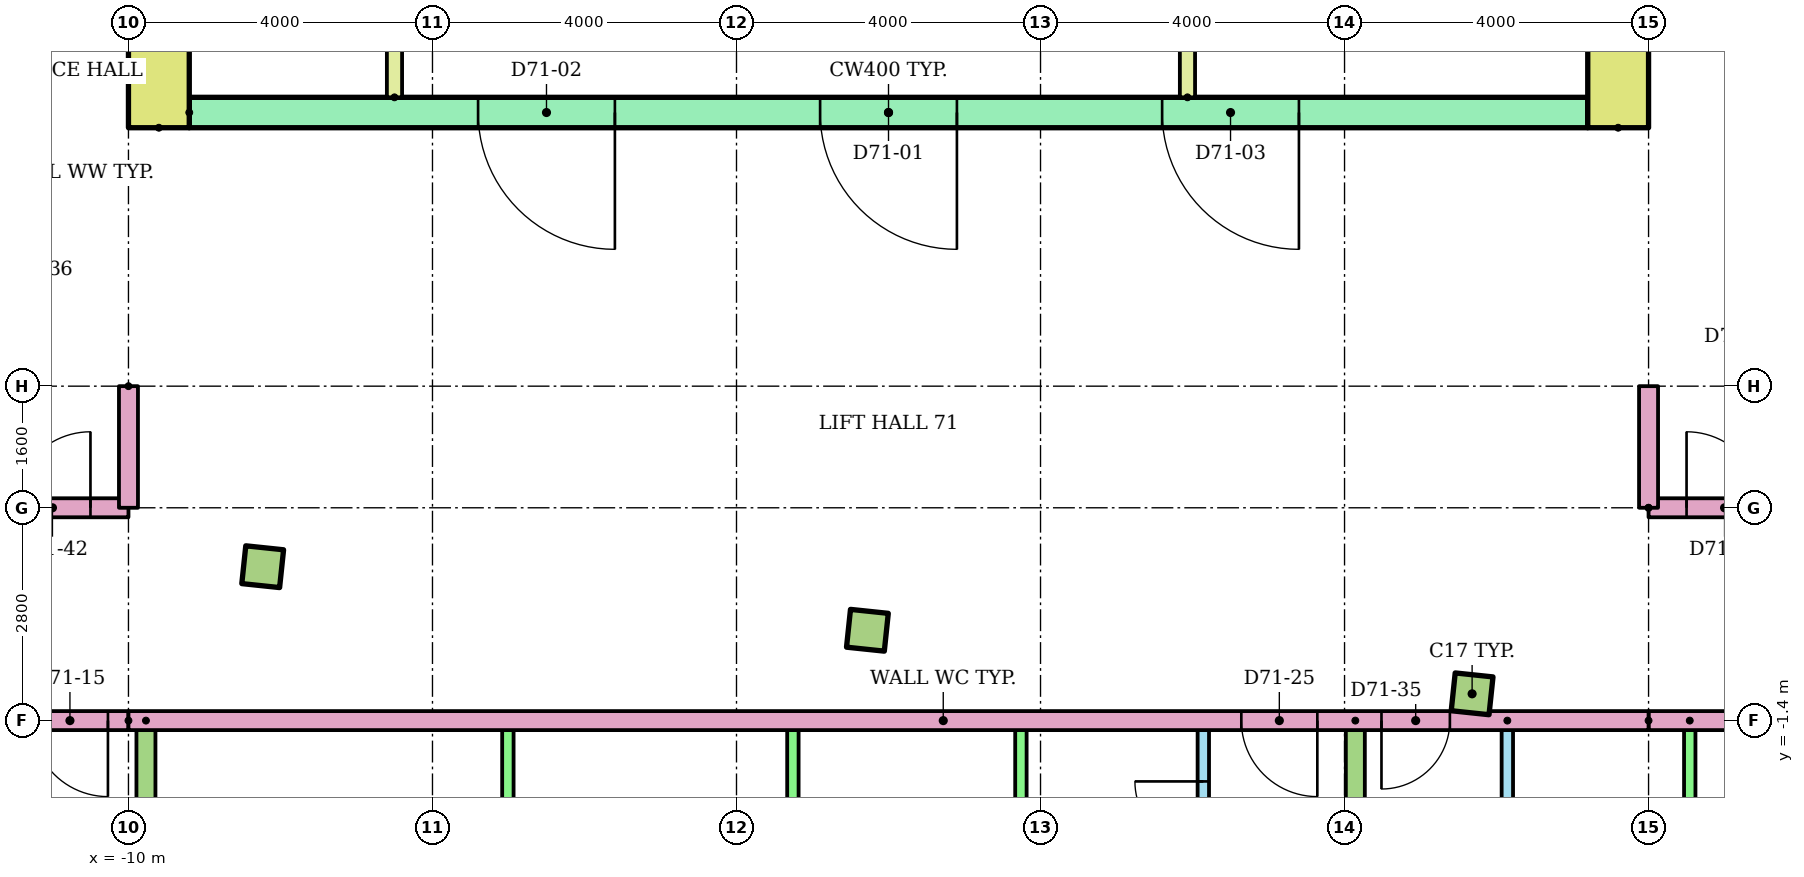
"""IFC4 building model, lengths in metres.
Left out: names, types, materials, properties, quantities, classifications, styles, units other than length and angle.
Written with IfcOpenShell. Run it as: python <this file> out.ifc"""

import sys

from ifc_helpers import new_model, si_unit, direction, frame, frame_2d, origin, origin_2d, place, context, subcontext, project, spatial, rectangle, extrude, element, fill, save


model = new_model("IFC4")
c1 = context("Model", 3, precision=1e-05, world=origin(), true_north=direction((0.0, 1.0)))
c2 = subcontext(c1, "Body", "Model", "MODEL_VIEW")
j1 = project(units=[si_unit("LENGTHUNIT", "METRE"), si_unit("PLANEANGLEUNIT", "RADIAN")], contexts=[c1])
p1 = place(None, origin())
s1 = spatial("IfcSite", under=j1, at=p1, CompositionType="ELEMENT")
p2 = place(p1, origin())
s2 = spatial("IfcBuilding", under=s1, at=p2, CompositionType="ELEMENT")
p3 = place(p2, frame((0.0, 0.0, 272.3)))
s3 = spatial("IfcBuildingStorey", under=s2, at=p3, CompositionType="ELEMENT", Elevation=272.3)
for number, where, z_axis, x_axis in (
    (1, (-8.234, 0.625, 0.0), (0.0, 0.0, 1.0), (0.995, -0.105, 0.0)),
    (2, (-0.278, -0.211, 0.0), (0.0, 0.0, 1.0), (0.995, -0.105, 0.0)),
    (3, (7.678, -1.048, 0.0), (0.0, 0.0, 1.0), (0.995, -0.105, 0.0)),
):
    element("IfcColumn", number, at=place(p3, frame(where, z_axis=z_axis, x_axis=x_axis)), inside=s3, PredefinedType="COLUMN", context=c2, shape_type="SweptSolid", body=[
        extrude(rectangle(XDim=0.5, YDim=0.5, at=origin_2d()), origin(), (0.0, 0.0, 1.0), 3.2),
    ])
for number, where, z_axis, x_axis in (
    (4, (-9.6, 6.4, 0.0), (0.0, 0.0, 1.0), (0.0, 1.0, 0.0)),
    (5, (9.6, 6.4, 0.0), (0.0, 0.0, 1.0), (0.0, 1.0, 0.0)),
):
    element("IfcWall", number, at=place(p3, frame(where, z_axis=z_axis, x_axis=x_axis)), inside=s3, PredefinedType="SHEAR", context=c2, shape_type="SweptSolid", body=[
        extrude(rectangle(XDim=13.6, YDim=0.8, at=frame_2d((6.8, 0.0))), origin(), (0.0, 0.0, 1.0), 2.92),
    ])
p4 = place(p3, frame((-9.2, 6.6, 0.0)))
e6 = element("IfcWall", 6, at=p4, inside=s3, PredefinedType="SHEAR", context=c2, shape_type="SweptSolid", body=[
    extrude(rectangle(XDim=18.4, YDim=0.4, at=frame_2d((9.2, 0.0))), origin(), (0.0, 0.0, 1.0), 2.92),
])
p5 = place(p4, frame((8.3, 0.0, 0.0)))
e7 = element("IfcOpeningElement", 7, at=p5, cuts=e6, PredefinedType="OPENING", context=c2, shape_type="SweptSolid", body=[
    extrude(rectangle(XDim=1.8, YDim=2.1, at=frame_2d((0.9, 1.05))), frame((0.0, 0.21, 0.0), z_axis=(0.0, -1.0, 0.0), x_axis=(1.0, 0.0, 0.0)), (0.0, 0.0, 1.0), 0.42),
])
p6 = place(p4, frame((3.8, 0.0, 0.0)))
e8 = element("IfcOpeningElement", 8, at=p6, cuts=e6, PredefinedType="OPENING", context=c2, shape_type="SweptSolid", body=[
    extrude(rectangle(XDim=1.8, YDim=2.1, at=frame_2d((0.9, 1.05))), frame((0.0, 0.21, 0.0), z_axis=(0.0, -1.0, 0.0), x_axis=(1.0, 0.0, 0.0)), (0.0, 0.0, 1.0), 0.42),
])
p7 = place(p4, frame((12.8, 0.0, 0.0)))
e9 = element("IfcOpeningElement", 9, at=p7, cuts=e6, PredefinedType="OPENING", context=c2, shape_type="SweptSolid", body=[
    extrude(rectangle(XDim=1.8, YDim=2.1, at=frame_2d((0.9, 1.05))), frame((0.0, 0.21, 0.0), z_axis=(0.0, -1.0, 0.0), x_axis=(1.0, 0.0, 0.0)), (0.0, 0.0, 1.0), 0.42),
])
p8 = place(p3, frame((3.933, 6.8, 0.0), z_axis=(0.0, 0.0, 1.0), x_axis=(0.0, 1.0, 0.0)))
e10 = element("IfcWall", 10, at=p8, inside=s3, PredefinedType="PARTITIONING", context=c2, shape_type="SweptSolid", body=[
    extrude(rectangle(XDim=3.3, YDim=0.2, at=frame_2d((1.65, 0.0))), origin(), (0.0, 0.0, 1.0), 2.92),
])
p9 = place(p8, frame((1.1, 0.0, 0.0)))
e11 = element("IfcOpeningElement", 11, at=p9, cuts=e10, PredefinedType="OPENING", context=c2, shape_type="SweptSolid", body=[
    extrude(rectangle(XDim=1.1, YDim=2.1, at=frame_2d((0.55, 1.05))), frame((0.0, 0.11, 0.0), z_axis=(0.0, -1.0, 0.0), x_axis=(1.0, 0.0, 0.0)), (0.0, 0.0, 1.0), 0.22),
])
p10 = place(p3, frame((-6.5, 6.8, 0.0), z_axis=(0.0, 0.0, 1.0), x_axis=(0.0, 1.0, 0.0)))
e12 = element("IfcWall", 12, at=p10, inside=s3, PredefinedType="PARTITIONING", context=c2, shape_type="SweptSolid", body=[
    extrude(rectangle(XDim=3.3, YDim=0.2, at=frame_2d((1.65, 0.0))), origin(), (0.0, 0.0, 1.0), 2.92),
])
p11 = place(p10, frame((1.15, 0.0, 0.0)))
e13 = element("IfcOpeningElement", 13, at=p11, cuts=e12, PredefinedType="OPENING", context=c2, shape_type="SweptSolid", body=[
    extrude(rectangle(XDim=1.0, YDim=2.1, at=frame_2d((0.5, 1.05))), frame((0.0, 0.11, 0.0), z_axis=(0.0, -1.0, 0.0), x_axis=(1.0, 0.0, 0.0)), (0.0, 0.0, 1.0), 0.22),
])
p12 = place(p3, frame((4.142, -5.9, 0.0), z_axis=(0.0, 0.0, 1.0), x_axis=(0.0, 1.0, 0.0)))
e14 = element("IfcWall", 14, at=p12, inside=s3, PredefinedType="PARTITIONING", context=c2, shape_type="SweptSolid", body=[
    extrude(rectangle(XDim=4.5, YDim=0.15, at=frame_2d((2.25, 0.0))), origin(), (0.0, 0.0, 1.0), 2.4),
])
p13 = place(p12, frame((2.8, 0.0, 0.0)))
e15 = element("IfcOpeningElement", 15, at=p13, cuts=e14, PredefinedType="OPENING", context=c2, shape_type="SweptSolid", body=[
    extrude(rectangle(XDim=0.9, YDim=2.1, at=frame_2d((0.45, 1.05))), frame((0.0, 0.085, 0.0), z_axis=(0.0, -1.0, 0.0), x_axis=(1.0, 0.0, 0.0)), (0.0, 0.0, 1.0), 0.17),
])
p14 = place(p12, frame((0.6, 0.0, 0.0)))
e16 = element("IfcOpeningElement", 16, at=p14, cuts=e14, PredefinedType="OPENING", context=c2, shape_type="SweptSolid", body=[
    extrude(rectangle(XDim=0.8, YDim=2.1, at=frame_2d((0.4, 1.05))), frame((0.0, 0.085, 0.0), z_axis=(0.0, -1.0, 0.0), x_axis=(1.0, 0.0, 0.0)), (0.0, 0.0, 1.0), 0.17),
])
for number, where, z_axis, x_axis in (
    (17, (1.742, -5.9, 0.0), (0.0, 0.0, 1.0), (0.0, 1.0, 0.0)),
    (18, (-1.258, -5.9, 0.0), (0.0, 0.0, 1.0), (0.0, 1.0, 0.0)),
    (19, (-5.008, -5.9, 0.0), (0.0, 0.0, 1.0), (0.0, 1.0, 0.0)),
):
    element("IfcWall", number, at=place(p3, frame(where, z_axis=z_axis, x_axis=x_axis)), inside=s3, PredefinedType="PARTITIONING", context=c2, shape_type="SweptSolid", body=[
        extrude(rectangle(XDim=4.5, YDim=0.15, at=frame_2d((2.25, 0.0))), origin(), (0.0, 0.0, 1.0), 2.4),
    ])
p15 = place(p3, frame((-9.77, -1.4, 0.0), z_axis=(0.0, 0.0, 1.0), x_axis=(0.0, -1.0, 0.0)))
e20 = element("IfcWall", 20, at=p15, inside=s3, PredefinedType="PARTITIONING", context=c2, shape_type="SweptSolid", body=[
    extrude(rectangle(XDim=12.504, YDim=0.25, at=frame_2d((6.252, 0.0))), origin(), (0.0, 0.0, 1.0), 2.4),
])
p16 = place(p3, frame((8.142, -1.4, 0.0), z_axis=(0.0, 0.0, 1.0), x_axis=(0.0, -1.0, 0.0)))
e21 = element("IfcWall", 21, at=p16, inside=s3, PredefinedType="PARTITIONING", context=c2, shape_type="SweptSolid", body=[
    extrude(rectangle(XDim=6.582, YDim=0.15, at=frame_2d((3.291, 0.0))), origin(), (0.0, 0.0, 1.0), 2.4),
])
p17 = place(p16, frame((1.3, 0.0, 0.0)))
e22 = element("IfcOpeningElement", 22, at=p17, cuts=e21, PredefinedType="OPENING", context=c2, shape_type="SweptSolid", body=[
    extrude(rectangle(XDim=0.9, YDim=2.1, at=frame_2d((0.45, 1.05))), frame((0.0, 0.085, 0.0), z_axis=(0.0, -1.0, 0.0), x_axis=(1.0, 0.0, 0.0)), (0.0, 0.0, 1.0), 0.17),
])
p18 = place(p16, frame((4.641, 0.0, 0.0)))
e23 = element("IfcOpeningElement", 23, at=p18, cuts=e21, PredefinedType="OPENING", context=c2, shape_type="SweptSolid", body=[
    extrude(rectangle(XDim=0.8, YDim=2.1, at=frame_2d((0.4, 1.05))), frame((0.0, 0.085, 0.0), z_axis=(0.0, -1.0, 0.0), x_axis=(1.0, 0.0, 0.0)), (0.0, 0.0, 1.0), 0.17),
])
p19 = place(p3, frame((10.542, -1.4, 0.0), z_axis=(0.0, 0.0, 1.0), x_axis=(0.0, -1.0, 0.0)))
e24 = element("IfcWall", 24, at=p19, inside=s3, PredefinedType="PARTITIONING", context=c2, shape_type="SweptSolid", body=[
    extrude(rectangle(XDim=6.582, YDim=0.15, at=frame_2d((3.291, 0.0))), origin(), (0.0, 0.0, 1.0), 2.4),
])
p20 = place(p3, frame((6.142, -1.4, 0.0), z_axis=(0.0, 0.0, 1.0), x_axis=(0.0, -1.0, 0.0)))
e25 = element("IfcWall", 25, at=p20, inside=s3, PredefinedType="PARTITIONING", context=c2, shape_type="SweptSolid", body=[
    extrude(rectangle(XDim=14.177, YDim=0.25, at=frame_2d((7.088, 0.0))), origin(), (0.0, 0.0, 1.0), 2.4),
])
p21 = place(p3, frame((-10.0, -1.4, 0.0), z_axis=(0.0, 0.0, 1.0), x_axis=(-1.0, 0.0, 0.0)))
e26 = element("IfcWall", 26, at=p21, inside=s3, PredefinedType="PARTITIONING", context=c2, shape_type="SweptSolid", body=[
    extrude(rectangle(XDim=13.56, YDim=0.25, at=frame_2d((6.78, 0.0))), origin(), (0.0, 0.0, 1.0), 2.4),
])
p22 = place(p21, frame((0.27, 0.0, 0.0)))
e27 = element("IfcOpeningElement", 27, at=p22, cuts=e26, PredefinedType="OPENING", context=c2, shape_type="SweptSolid", body=[
    extrude(rectangle(XDim=1.0, YDim=2.1, at=frame_2d((0.5, 1.05))), frame((0.0, 0.135, 0.0), z_axis=(0.0, -1.0, 0.0), x_axis=(1.0, 0.0, 0.0)), (0.0, 0.0, 1.0), 0.27),
])
p23 = place(p3, frame((25.0, -1.4, 0.0), z_axis=(0.0, 0.0, 1.0), x_axis=(-1.0, 0.0, 0.0)))
e28 = element("IfcWall", 28, at=p23, inside=s3, PredefinedType="PARTITIONING", context=c2, shape_type="SweptSolid", body=[
    extrude(rectangle(XDim=15.0, YDim=0.25, at=frame_2d((7.5, 0.0))), origin(), (0.0, 0.0, 1.0), 2.4),
])
p24 = place(p3, frame((-23.265, 1.4, 0.0)))
e29 = element("IfcWall", 29, at=p24, inside=s3, PredefinedType="PARTITIONING", context=c2, shape_type="SweptSolid", body=[
    extrude(rectangle(XDim=13.265, YDim=0.25, at=frame_2d((6.633, 0.0))), origin(), (0.0, 0.0, 1.0), 2.4),
])
p25 = place(p24, frame((11.765, 0.0, 0.0)))
e30 = element("IfcOpeningElement", 30, at=p25, cuts=e29, PredefinedType="OPENING", context=c2, shape_type="SweptSolid", body=[
    extrude(rectangle(XDim=1.0, YDim=2.1, at=frame_2d((0.5, 1.05))), frame((0.0, 0.135, 0.0), z_axis=(0.0, -1.0, 0.0), x_axis=(1.0, 0.0, 0.0)), (0.0, 0.0, 1.0), 0.27),
])
p26 = place(p3, frame((10.0, 1.4, 0.0)))
e31 = element("IfcWall", 31, at=p26, inside=s3, PredefinedType="PARTITIONING", context=c2, shape_type="SweptSolid", body=[
    extrude(rectangle(XDim=15.0, YDim=0.25, at=frame_2d((7.5, 0.0))), origin(), (0.0, 0.0, 1.0), 2.4),
])
p27 = place(p26, frame((0.5, 0.0, 0.0)))
e32 = element("IfcOpeningElement", 32, at=p27, cuts=e31, PredefinedType="OPENING", context=c2, shape_type="SweptSolid", body=[
    extrude(rectangle(XDim=1.0, YDim=2.1, at=frame_2d((0.5, 1.05))), frame((0.0, 0.135, 0.0), z_axis=(0.0, -1.0, 0.0), x_axis=(1.0, 0.0, 0.0)), (0.0, 0.0, 1.0), 0.27),
])
p28 = place(p3, frame((10.0, -1.4, 0.0), z_axis=(0.0, 0.0, 1.0), x_axis=(-1.0, 0.0, 0.0)))
e33 = element("IfcWall", 33, at=p28, inside=s3, PredefinedType="PARTITIONING", context=c2, shape_type="SweptSolid", body=[
    extrude(rectangle(XDim=20.0, YDim=0.25, at=frame_2d((10.0, 0.0))), origin(), (0.0, 0.0, 1.0), 2.4),
])
p29 = place(p28, frame((4.358, 0.0, 0.0)))
e34 = element("IfcOpeningElement", 34, at=p29, cuts=e33, PredefinedType="OPENING", context=c2, shape_type="SweptSolid", body=[
    extrude(rectangle(XDim=1.0, YDim=2.1, at=frame_2d((0.5, 1.05))), frame((0.0, 0.135, 0.0), z_axis=(0.0, -1.0, 0.0), x_axis=(1.0, 0.0, 0.0)), (0.0, 0.0, 1.0), 0.27),
])
p30 = place(p28, frame((2.614, 0.0, 0.0)))
e35 = element("IfcOpeningElement", 35, at=p30, cuts=e33, PredefinedType="OPENING", context=c2, shape_type="SweptSolid", body=[
    extrude(rectangle(XDim=0.9, YDim=2.1, at=frame_2d((0.45, 1.05))), frame((0.0, 0.135, 0.0), z_axis=(0.0, -1.0, 0.0), x_axis=(1.0, 0.0, 0.0)), (0.0, 0.0, 1.0), 0.27),
])
for number, where, z_axis, x_axis in (
    (36, (-10.0, 3.0, 0.0), (0.0, 0.0, 1.0), (0.0, -1.0, 0.0)),
    (37, (10.0, 1.4, 0.0), (0.0, 0.0, 1.0), (0.0, 1.0, 0.0)),
):
    element("IfcWall", number, at=place(p3, frame(where, z_axis=z_axis, x_axis=x_axis)), inside=s3, PredefinedType="PARTITIONING", context=c2, shape_type="SweptSolid", body=[
        extrude(rectangle(XDim=1.6, YDim=0.25, at=frame_2d((0.8, 0.0))), origin(), (0.0, 0.0, 1.0), 2.4),
    ])
p31 = place(p5, frame((1.8, 0.0, 0.0), z_axis=(0.0, 0.0, 1.0), x_axis=(-1.0, 0.0, 0.0)))
e38 = element("IfcDoor", 38, at=p31, inside=s3, OperationType="DOUBLE_DOOR_SINGLE_SWING", PredefinedType="DOOR", context=c2, shape_type="SweptSolid", body=[
    extrude(rectangle(XDim=1.8, YDim=2.1, at=frame_2d((0.9, 1.05))), frame((0.0, 0.025, 0.0), z_axis=(0.0, -1.0, 0.0), x_axis=(1.0, 0.0, 0.0)), (0.0, 0.0, 1.0), 0.05),
])
fill(e7, e38)
p32 = place(p6, frame((1.8, 0.0, 0.0), z_axis=(0.0, 0.0, 1.0), x_axis=(-1.0, 0.0, 0.0)))
e39 = element("IfcDoor", 39, at=p32, inside=s3, OperationType="DOUBLE_DOOR_SINGLE_SWING", PredefinedType="DOOR", context=c2, shape_type="SweptSolid", body=[
    extrude(rectangle(XDim=1.8, YDim=2.1, at=frame_2d((0.9, 1.05))), frame((0.0, 0.025, 0.0), z_axis=(0.0, -1.0, 0.0), x_axis=(1.0, 0.0, 0.0)), (0.0, 0.0, 1.0), 0.05),
])
fill(e8, e39)
p33 = place(p7, frame((1.8, 0.0, 0.0), z_axis=(0.0, 0.0, 1.0), x_axis=(-1.0, 0.0, 0.0)))
e40 = element("IfcDoor", 40, at=p33, inside=s3, OperationType="DOUBLE_DOOR_SINGLE_SWING", PredefinedType="DOOR", context=c2, shape_type="SweptSolid", body=[
    extrude(rectangle(XDim=1.8, YDim=2.1, at=frame_2d((0.9, 1.05))), frame((0.0, 0.025, 0.0), z_axis=(0.0, -1.0, 0.0), x_axis=(1.0, 0.0, 0.0)), (0.0, 0.0, 1.0), 0.05),
])
fill(e9, e40)
p34 = place(p22, origin())
e41 = element("IfcDoor", 41, at=p34, inside=s3, OperationType="SINGLE_SWING_LEFT", PredefinedType="DOOR", context=c2, shape_type="SweptSolid", body=[
    extrude(rectangle(XDim=1.0, YDim=2.1, at=frame_2d((0.5, 1.05))), frame((0.0, 0.025, 0.0), z_axis=(0.0, -1.0, 0.0), x_axis=(1.0, 0.0, 0.0)), (0.0, 0.0, 1.0), 0.05),
])
fill(e27, e41)
p35 = place(p13, origin())
e42 = element("IfcDoor", 42, at=p35, inside=s3, OperationType="SINGLE_SWING_RIGHT", PredefinedType="DOOR", context=c2, shape_type="SweptSolid", body=[
    extrude(rectangle(XDim=0.9, YDim=2.1, at=frame_2d((0.45, 1.05))), frame((0.0, 0.025, 0.0), z_axis=(0.0, -1.0, 0.0), x_axis=(1.0, 0.0, 0.0)), (0.0, 0.0, 1.0), 0.05),
])
fill(e15, e42)
p36 = place(p29, origin())
e43 = element("IfcDoor", 43, at=p36, inside=s3, OperationType="SINGLE_SWING_LEFT", PredefinedType="DOOR", context=c2, shape_type="SweptSolid", body=[
    extrude(rectangle(XDim=1.0, YDim=2.1, at=frame_2d((0.5, 1.05))), frame((0.0, 0.025, 0.0), z_axis=(0.0, -1.0, 0.0), x_axis=(1.0, 0.0, 0.0)), (0.0, 0.0, 1.0), 0.05),
])
fill(e34, e43)
p37 = place(p30, origin())
e44 = element("IfcDoor", 44, at=p37, inside=s3, OperationType="SINGLE_SWING_RIGHT", PredefinedType="DOOR", context=c2, shape_type="SweptSolid", body=[
    extrude(rectangle(XDim=0.9, YDim=2.1, at=frame_2d((0.45, 1.05))), frame((0.0, 0.025, 0.0), z_axis=(0.0, -1.0, 0.0), x_axis=(1.0, 0.0, 0.0)), (0.0, 0.0, 1.0), 0.05),
])
fill(e35, e44)
p38 = place(p25, origin())
e45 = element("IfcDoor", 45, at=p38, inside=s3, OperationType="SINGLE_SWING_RIGHT", PredefinedType="DOOR", context=c2, shape_type="SweptSolid", body=[
    extrude(rectangle(XDim=1.0, YDim=2.1, at=frame_2d((0.5, 1.05))), frame((0.0, 0.025, 0.0), z_axis=(0.0, -1.0, 0.0), x_axis=(1.0, 0.0, 0.0)), (0.0, 0.0, 1.0), 0.05),
])
fill(e30, e45)
p39 = place(p27, origin())
e46 = element("IfcDoor", 46, at=p39, inside=s3, OperationType="SINGLE_SWING_LEFT", PredefinedType="DOOR", context=c2, shape_type="SweptSolid", body=[
    extrude(rectangle(XDim=1.0, YDim=2.1, at=frame_2d((0.5, 1.05))), frame((0.0, 0.025, 0.0), z_axis=(0.0, -1.0, 0.0), x_axis=(1.0, 0.0, 0.0)), (0.0, 0.0, 1.0), 0.05),
])
fill(e32, e46)
save(model, sys.argv[1])
